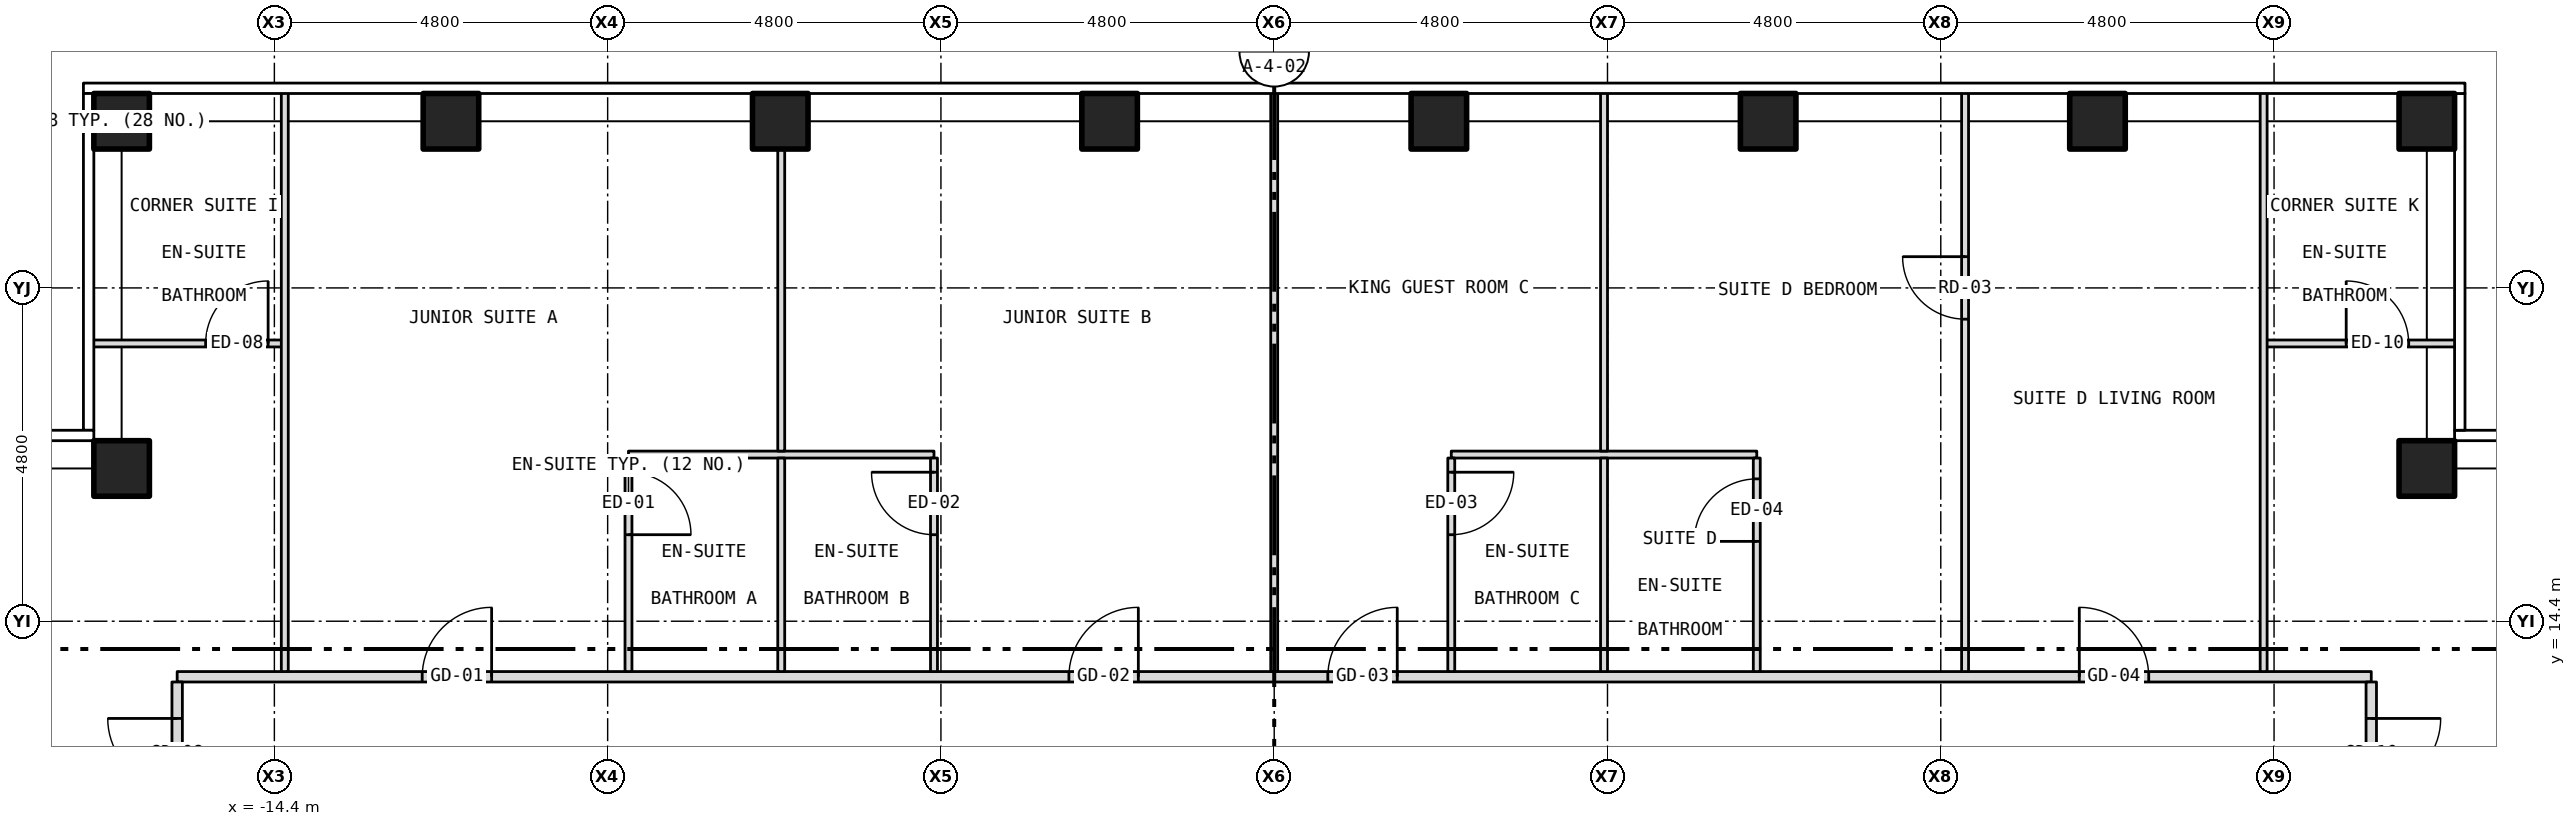
"""IFC4 building model, lengths in metres.
Left out: names, types, materials, properties, quantities, classifications, styles, units other than length and angle.
Written with IfcOpenShell. Run it as: python <this file> out.ifc"""

import sys

from ifc_helpers import new_model, si_unit, direction, frame, frame_2d, origin, origin_2d, place, context, subcontext, project, spatial, rectangle, hollow_rectangle, extrude, element, fill, save


model = new_model("IFC4")
c1 = context("Model", 3, precision=1e-05, world=origin(), true_north=direction((0.0, 1.0)))
c2 = subcontext(c1, "Body", "Model", "MODEL_VIEW")
j1 = project(units=[si_unit("LENGTHUNIT", "METRE"), si_unit("PLANEANGLEUNIT", "RADIAN")], contexts=[c1])
p1 = place(None, origin())
s1 = spatial("IfcSite", under=j1, at=p1, CompositionType="ELEMENT")
p2 = place(p1, origin())
s2 = spatial("IfcBuilding", under=s1, at=p2, CompositionType="ELEMENT")
p3 = place(p2, frame((0.0, 0.0, 179.5)))
s3 = spatial("IfcBuildingStorey", under=s2, at=p3, CompositionType="ELEMENT", Elevation=179.5)
for number, where, z_axis, x_axis in (
    (1, (-16.6, 21.6, -0.15), (0.0, 0.0, 1.0), (1.0, 0.0, 0.0)),
    (2, (-11.857, 21.6, -0.15), (0.0, 0.0, 1.0), (1.0, 0.0, 0.0)),
    (3, (-7.114, 21.6, -0.15), (0.0, 0.0, 1.0), (1.0, 0.0, 0.0)),
    (4, (-2.371, 21.6, -0.15), (0.0, 0.0, 1.0), (1.0, 0.0, 0.0)),
    (5, (2.371, 21.6, -0.15), (0.0, 0.0, 1.0), (1.0, 0.0, 0.0)),
    (6, (7.114, 21.6, -0.15), (0.0, 0.0, 1.0), (1.0, 0.0, 0.0)),
    (7, (11.857, 21.6, -0.15), (0.0, 0.0, 1.0), (1.0, 0.0, 0.0)),
    (8, (16.6, 21.6, -0.15), (0.0, 0.0, 1.0), (1.0, 0.0, 0.0)),
    (9, (-16.6, 16.6, -0.15), (0.0, 0.0, 1.0), (1.0, 0.0, 0.0)),
    (10, (16.6, 16.6, -0.15), (0.0, 0.0, 1.0), (1.0, 0.0, 0.0)),
):
    element("IfcColumn", number, at=place(p3, frame(where, z_axis=z_axis, x_axis=x_axis)), inside=s3, PredefinedType="COLUMN", context=c2, shape_type="SweptSolid", body=[
        extrude(hollow_rectangle(XDim=0.8, YDim=0.8, WallThickness=0.045, at=origin_2d()), origin(), (0.0, 0.0, 1.0), 3.5),
    ])
p4 = place(p3, frame((-15.8, 13.6, 0.0), z_axis=(0.0, 0.0, 1.0), x_axis=(1.0, 0.0, 0.0)))
e11 = element("IfcWall", 11, at=p4, inside=s3, PredefinedType="PARTITIONING", context=c2, shape_type="SweptSolid", body=[
    extrude(rectangle(XDim=31.6, YDim=0.15, at=frame_2d((15.8, 0.0))), origin(), (0.0, 0.0, 1.0), 3.35),
])
p5 = place(p4, frame((3.529, 0.0, 0.0)))
e12 = element("IfcOpeningElement", 12, at=p5, cuts=e11, PredefinedType="OPENING", context=c2, shape_type="SweptSolid", body=[
    extrude(rectangle(XDim=1.0, YDim=2.1, at=frame_2d((0.5, 1.05))), frame((0.0, 0.087, 0.0), z_axis=(0.0, -1.0, 0.0), x_axis=(1.0, 0.0, 0.0)), (0.0, 0.0, 1.0), 0.174),
])
p6 = place(p4, frame((12.843, 0.0, 0.0)))
e13 = element("IfcOpeningElement", 13, at=p6, cuts=e11, PredefinedType="OPENING", context=c2, shape_type="SweptSolid", body=[
    extrude(rectangle(XDim=1.0, YDim=2.1, at=frame_2d((0.5, 1.05))), frame((0.0, 0.087, 0.0), z_axis=(0.0, -1.0, 0.0), x_axis=(1.0, 0.0, 0.0)), (0.0, 0.0, 1.0), 0.174),
])
p7 = place(p4, frame((16.572, 0.0, 0.0)))
e14 = element("IfcOpeningElement", 14, at=p7, cuts=e11, PredefinedType="OPENING", context=c2, shape_type="SweptSolid", body=[
    extrude(rectangle(XDim=1.0, YDim=2.1, at=frame_2d((0.5, 1.05))), frame((0.0, 0.087, 0.0), z_axis=(0.0, -1.0, 0.0), x_axis=(1.0, 0.0, 0.0)), (0.0, 0.0, 1.0), 0.174),
])
p8 = place(p4, frame((27.395, 0.0, 0.0)))
e15 = element("IfcOpeningElement", 15, at=p8, cuts=e11, PredefinedType="OPENING", context=c2, shape_type="SweptSolid", body=[
    extrude(rectangle(XDim=1.0, YDim=2.1, at=frame_2d((0.5, 1.05))), frame((0.0, 0.087, 0.0), z_axis=(0.0, -1.0, 0.0), x_axis=(1.0, 0.0, 0.0)), (0.0, 0.0, 1.0), 0.174),
])
p9 = place(p3, frame((-9.3, 16.8, 0.0), z_axis=(0.0, 0.0, 1.0), x_axis=(1.0, 0.0, 0.0)))
e16 = element("IfcWall", 16, at=p9, inside=s3, PredefinedType="PARTITIONING", context=c2, shape_type="SweptSolid", body=[
    extrude(rectangle(XDim=4.4, YDim=0.1, at=frame_2d((2.2, 0.0))), origin(), (0.0, 0.0, 1.0), 3.35),
])
p10 = place(p3, frame((2.55, 16.8, 0.0), z_axis=(0.0, 0.0, 1.0), x_axis=(1.0, 0.0, 0.0)))
e17 = element("IfcWall", 17, at=p10, inside=s3, PredefinedType="PARTITIONING", context=c2, shape_type="SweptSolid", body=[
    extrude(rectangle(XDim=4.4, YDim=0.1, at=frame_2d((2.2, 0.0))), origin(), (0.0, 0.0, 1.0), 3.35),
])
p11 = place(p3, frame((-17.03, 18.4, 0.0), z_axis=(0.0, 0.0, 1.0), x_axis=(1.0, 0.0, 0.0)))
e18 = element("IfcWall", 18, at=p11, inside=s3, PredefinedType="PARTITIONING", context=c2, shape_type="SweptSolid", body=[
    extrude(rectangle(XDim=2.78, YDim=0.1, at=frame_2d((1.39, 0.0))), origin(), (0.0, 0.0, 1.0), 3.35),
])
p12 = place(p11, frame((1.64, 0.0, 0.0)))
e19 = element("IfcOpeningElement", 19, at=p12, cuts=e18, PredefinedType="OPENING", context=c2, shape_type="SweptSolid", body=[
    extrude(rectangle(XDim=0.9, YDim=2.1, at=frame_2d((0.45, 1.05))), frame((0.0, 0.062, 0.0), z_axis=(0.0, -1.0, 0.0), x_axis=(1.0, 0.0, 0.0)), (0.0, 0.0, 1.0), 0.124),
])
p13 = place(p3, frame((14.25, 18.4, 0.0), z_axis=(0.0, 0.0, 1.0), x_axis=(1.0, 0.0, 0.0)))
e20 = element("IfcWall", 20, at=p13, inside=s3, PredefinedType="PARTITIONING", context=c2, shape_type="SweptSolid", body=[
    extrude(rectangle(XDim=2.78, YDim=0.1, at=frame_2d((1.39, 0.0))), origin(), (0.0, 0.0, 1.0), 3.35),
])
p14 = place(p13, frame((1.189, 0.0, 0.0)))
e21 = element("IfcOpeningElement", 21, at=p14, cuts=e20, PredefinedType="OPENING", context=c2, shape_type="SweptSolid", body=[
    extrude(rectangle(XDim=0.9, YDim=2.1, at=frame_2d((0.45, 1.05))), frame((0.0, 0.062, 0.0), z_axis=(0.0, -1.0, 0.0), x_axis=(1.0, 0.0, 0.0)), (0.0, 0.0, 1.0), 0.124),
])
p15 = place(p3, frame((-15.8, 10.92, 0.0), z_axis=(0.0, 0.0, 1.0), x_axis=(0.0, 1.0, 0.0)))
e22 = element("IfcWall", 22, at=p15, inside=s3, PredefinedType="PARTITIONING", context=c2, shape_type="SweptSolid", body=[
    extrude(rectangle(XDim=2.605, YDim=0.15, at=frame_2d((1.302, 0.0))), origin(), (0.0, 0.0, 1.0), 3.35),
])
p16 = place(p15, frame((1.08, 0.0, 0.0)))
e23 = element("IfcOpeningElement", 23, at=p16, cuts=e22, PredefinedType="OPENING", context=c2, shape_type="SweptSolid", body=[
    extrude(rectangle(XDim=1.0, YDim=2.1, at=frame_2d((0.5, 1.05))), frame((0.0, 0.087, 0.0), z_axis=(0.0, -1.0, 0.0), x_axis=(1.0, 0.0, 0.0)), (0.0, 0.0, 1.0), 0.174),
])
p17 = place(p3, frame((-14.25, 13.675, 0.0), z_axis=(0.0, 0.0, 1.0), x_axis=(0.0, 1.0, 0.0)))
e24 = element("IfcWall", 24, at=p17, inside=s3, PredefinedType="PARTITIONING", context=c2, shape_type="SweptSolid", body=[
    extrude(rectangle(XDim=8.355, YDim=0.1, at=frame_2d((4.177, 0.0))), origin(), (0.0, 0.0, 1.0), 2.817),
])
p18 = place(p3, frame((-9.3, 13.675, 0.0), z_axis=(0.0, 0.0, 1.0), x_axis=(0.0, 1.0, 0.0)))
e25 = element("IfcWall", 25, at=p18, inside=s3, PredefinedType="PARTITIONING", context=c2, shape_type="SweptSolid", body=[
    extrude(rectangle(XDim=3.075, YDim=0.1, at=frame_2d((1.538, 0.0))), origin(), (0.0, 0.0, 1.0), 3.35),
])
p19 = place(p18, frame((1.971, 0.0, 0.0)))
e26 = element("IfcOpeningElement", 26, at=p19, cuts=e25, PredefinedType="OPENING", context=c2, shape_type="SweptSolid", body=[
    extrude(rectangle(XDim=0.9, YDim=2.1, at=frame_2d((0.45, 1.05))), frame((0.0, 0.062, 0.0), z_axis=(0.0, -1.0, 0.0), x_axis=(1.0, 0.0, 0.0)), (0.0, 0.0, 1.0), 0.124),
])
p20 = place(p3, frame((-7.1, 13.675, 0.0), z_axis=(0.0, 0.0, 1.0), x_axis=(0.0, 1.0, 0.0)))
e27 = element("IfcWall", 27, at=p20, inside=s3, PredefinedType="PARTITIONING", context=c2, shape_type="SweptSolid", body=[
    extrude(rectangle(XDim=3.075, YDim=0.1, at=frame_2d((1.538, 0.0))), origin(), (0.0, 0.0, 1.0), 3.35),
])
p21 = place(p3, frame((-7.1, 16.85, 0.0), z_axis=(0.0, 0.0, 1.0), x_axis=(0.0, 1.0, 0.0)))
e28 = element("IfcWall", 28, at=p21, inside=s3, PredefinedType="PARTITIONING", context=c2, shape_type="SweptSolid", body=[
    extrude(rectangle(XDim=4.63, YDim=0.1, at=frame_2d((2.315, 0.0))), origin(), (0.0, 0.0, 1.0), 3.35),
])
p22 = place(p3, frame((-4.9, 13.675, 0.0), z_axis=(0.0, 0.0, 1.0), x_axis=(0.0, 1.0, 0.0)))
e29 = element("IfcWall", 29, at=p22, inside=s3, PredefinedType="PARTITIONING", context=c2, shape_type="SweptSolid", body=[
    extrude(rectangle(XDim=3.075, YDim=0.1, at=frame_2d((1.538, 0.0))), origin(), (0.0, 0.0, 1.0), 2.817),
])
p23 = place(p22, frame((1.971, 0.0, 0.0)))
e30 = element("IfcOpeningElement", 30, at=p23, cuts=e29, PredefinedType="OPENING", context=c2, shape_type="SweptSolid", body=[
    extrude(rectangle(XDim=0.9, YDim=2.1, at=frame_2d((0.45, 1.05))), frame((0.0, 0.062, 0.0), z_axis=(0.0, -1.0, 0.0), x_axis=(1.0, 0.0, 0.0)), (0.0, 0.0, 1.0), 0.124),
])
p24 = place(p3, frame((0.0, 13.675, 0.0), z_axis=(0.0, 0.0, 1.0), x_axis=(0.0, 1.0, 0.0)))
e31 = element("IfcWall", 31, at=p24, inside=s3, PredefinedType="PARTITIONING", context=c2, shape_type="SweptSolid", body=[
    extrude(rectangle(XDim=8.355, YDim=0.1, at=frame_2d((4.177, 0.0))), origin(), (0.0, 0.0, 1.0), 2.728),
])
p25 = place(p3, frame((2.55, 13.675, 0.0), z_axis=(0.0, 0.0, 1.0), x_axis=(0.0, 1.0, 0.0)))
e32 = element("IfcWall", 32, at=p25, inside=s3, PredefinedType="PARTITIONING", context=c2, shape_type="SweptSolid", body=[
    extrude(rectangle(XDim=3.075, YDim=0.1, at=frame_2d((1.538, 0.0))), origin(), (0.0, 0.0, 1.0), 3.35),
])
p26 = place(p25, frame((1.971, 0.0, 0.0)))
e33 = element("IfcOpeningElement", 33, at=p26, cuts=e32, PredefinedType="OPENING", context=c2, shape_type="SweptSolid", body=[
    extrude(rectangle(XDim=0.9, YDim=2.1, at=frame_2d((0.45, 1.05))), frame((0.0, 0.062, 0.0), z_axis=(0.0, -1.0, 0.0), x_axis=(1.0, 0.0, 0.0)), (0.0, 0.0, 1.0), 0.124),
])
p27 = place(p3, frame((4.75, 13.675, 0.0), z_axis=(0.0, 0.0, 1.0), x_axis=(0.0, 1.0, 0.0)))
e34 = element("IfcWall", 34, at=p27, inside=s3, PredefinedType="PARTITIONING", context=c2, shape_type="SweptSolid", body=[
    extrude(rectangle(XDim=3.075, YDim=0.1, at=frame_2d((1.538, 0.0))), origin(), (0.0, 0.0, 1.0), 2.817),
])
p28 = place(p3, frame((4.75, 16.85, 0.0), z_axis=(0.0, 0.0, 1.0), x_axis=(0.0, 1.0, 0.0)))
e35 = element("IfcWall", 35, at=p28, inside=s3, PredefinedType="PARTITIONING", context=c2, shape_type="SweptSolid", body=[
    extrude(rectangle(XDim=5.18, YDim=0.1, at=frame_2d((2.59, 0.0))), origin(), (0.0, 0.0, 1.0), 2.817),
])
p29 = place(p3, frame((6.95, 13.675, 0.0), z_axis=(0.0, 0.0, 1.0), x_axis=(0.0, 1.0, 0.0)))
e36 = element("IfcWall", 36, at=p29, inside=s3, PredefinedType="PARTITIONING", context=c2, shape_type="SweptSolid", body=[
    extrude(rectangle(XDim=3.075, YDim=0.1, at=frame_2d((1.538, 0.0))), origin(), (0.0, 0.0, 1.0), 3.35),
])
p30 = place(p29, frame((1.875, 0.0, 0.0)))
e37 = element("IfcOpeningElement", 37, at=p30, cuts=e36, PredefinedType="OPENING", context=c2, shape_type="SweptSolid", body=[
    extrude(rectangle(XDim=0.9, YDim=2.1, at=frame_2d((0.45, 1.05))), frame((0.0, 0.062, 0.0), z_axis=(0.0, -1.0, 0.0), x_axis=(1.0, 0.0, 0.0)), (0.0, 0.0, 1.0), 0.124),
])
p31 = place(p3, frame((9.95, 13.675, 0.0), z_axis=(0.0, 0.0, 1.0), x_axis=(0.0, 1.0, 0.0)))
e38 = element("IfcWall", 38, at=p31, inside=s3, PredefinedType="PARTITIONING", context=c2, shape_type="SweptSolid", body=[
    extrude(rectangle(XDim=8.355, YDim=0.1, at=frame_2d((4.177, 0.0))), origin(), (0.0, 0.0, 1.0), 3.35),
])
p32 = place(p31, frame((5.075, 0.0, 0.0)))
e39 = element("IfcOpeningElement", 39, at=p32, cuts=e38, PredefinedType="OPENING", context=c2, shape_type="SweptSolid", body=[
    extrude(rectangle(XDim=0.9, YDim=2.1, at=frame_2d((0.45, 1.05))), frame((0.0, 0.062, 0.0), z_axis=(0.0, -1.0, 0.0), x_axis=(1.0, 0.0, 0.0)), (0.0, 0.0, 1.0), 0.124),
])
p33 = place(p3, frame((14.25, 13.675, 0.0), z_axis=(0.0, 0.0, 1.0), x_axis=(0.0, 1.0, 0.0)))
e40 = element("IfcWall", 40, at=p33, inside=s3, PredefinedType="PARTITIONING", context=c2, shape_type="SweptSolid", body=[
    extrude(rectangle(XDim=8.355, YDim=0.1, at=frame_2d((4.177, 0.0))), origin(), (0.0, 0.0, 1.0), 2.817),
])
p34 = place(p3, frame((15.8, 10.92, 0.0), z_axis=(0.0, 0.0, 1.0), x_axis=(0.0, 1.0, 0.0)))
e41 = element("IfcWall", 41, at=p34, inside=s3, PredefinedType="PARTITIONING", context=c2, shape_type="SweptSolid", body=[
    extrude(rectangle(XDim=2.605, YDim=0.15, at=frame_2d((1.302, 0.0))), origin(), (0.0, 0.0, 1.0), 3.35),
])
p35 = place(p34, frame((1.08, 0.0, 0.0)))
e42 = element("IfcOpeningElement", 42, at=p35, cuts=e41, PredefinedType="OPENING", context=c2, shape_type="SweptSolid", body=[
    extrude(rectangle(XDim=1.0, YDim=2.1, at=frame_2d((0.5, 1.05))), frame((0.0, 0.087, 0.0), z_axis=(0.0, -1.0, 0.0), x_axis=(1.0, 0.0, 0.0)), (0.0, 0.0, 1.0), 0.174),
])
p36 = place(p5, origin())
e43 = element("IfcDoor", 43, at=p36, inside=s3, OperationType="SINGLE_SWING_RIGHT", PredefinedType="DOOR", context=c2, shape_type="SweptSolid", body=[
    extrude(rectangle(XDim=1.0, YDim=2.1, at=frame_2d((0.5, 1.05))), frame((0.0, 0.025, 0.0), z_axis=(0.0, -1.0, 0.0), x_axis=(1.0, 0.0, 0.0)), (0.0, 0.0, 1.0), 0.05),
])
fill(e12, e43)
p37 = place(p19, origin())
e44 = element("IfcDoor", 44, at=p37, inside=s3, OperationType="SINGLE_SWING_LEFT", PredefinedType="DOOR", context=c2, shape_type="SweptSolid", body=[
    extrude(rectangle(XDim=0.9, YDim=2.1, at=frame_2d((0.45, 1.05))), frame((0.0, 0.025, 0.0), z_axis=(0.0, -1.0, 0.0), x_axis=(1.0, 0.0, 0.0)), (0.0, 0.0, 1.0), 0.05),
])
fill(e26, e44)
p38 = place(p6, origin())
e45 = element("IfcDoor", 45, at=p38, inside=s3, OperationType="SINGLE_SWING_RIGHT", PredefinedType="DOOR", context=c2, shape_type="SweptSolid", body=[
    extrude(rectangle(XDim=1.0, YDim=2.1, at=frame_2d((0.5, 1.05))), frame((0.0, 0.025, 0.0), z_axis=(0.0, -1.0, 0.0), x_axis=(1.0, 0.0, 0.0)), (0.0, 0.0, 1.0), 0.05),
])
fill(e13, e45)
p39 = place(p23, origin())
e46 = element("IfcDoor", 46, at=p39, inside=s3, OperationType="SINGLE_SWING_RIGHT", PredefinedType="DOOR", context=c2, shape_type="SweptSolid", body=[
    extrude(rectangle(XDim=0.9, YDim=2.1, at=frame_2d((0.45, 1.05))), frame((0.0, 0.025, 0.0), z_axis=(0.0, -1.0, 0.0), x_axis=(1.0, 0.0, 0.0)), (0.0, 0.0, 1.0), 0.05),
])
fill(e30, e46)
p40 = place(p7, origin())
e47 = element("IfcDoor", 47, at=p40, inside=s3, OperationType="SINGLE_SWING_RIGHT", PredefinedType="DOOR", context=c2, shape_type="SweptSolid", body=[
    extrude(rectangle(XDim=1.0, YDim=2.1, at=frame_2d((0.5, 1.05))), frame((0.0, 0.025, 0.0), z_axis=(0.0, -1.0, 0.0), x_axis=(1.0, 0.0, 0.0)), (0.0, 0.0, 1.0), 0.05),
])
fill(e14, e47)
p41 = place(p26, origin())
e48 = element("IfcDoor", 48, at=p41, inside=s3, OperationType="SINGLE_SWING_RIGHT", PredefinedType="DOOR", context=c2, shape_type="SweptSolid", body=[
    extrude(rectangle(XDim=0.9, YDim=2.1, at=frame_2d((0.45, 1.05))), frame((0.0, 0.025, 0.0), z_axis=(0.0, -1.0, 0.0), x_axis=(1.0, 0.0, 0.0)), (0.0, 0.0, 1.0), 0.05),
])
fill(e33, e48)
p42 = place(p8, origin())
e49 = element("IfcDoor", 49, at=p42, inside=s3, OperationType="SINGLE_SWING_LEFT", PredefinedType="DOOR", context=c2, shape_type="SweptSolid", body=[
    extrude(rectangle(XDim=1.0, YDim=2.1, at=frame_2d((0.5, 1.05))), frame((0.0, 0.025, 0.0), z_axis=(0.0, -1.0, 0.0), x_axis=(1.0, 0.0, 0.0)), (0.0, 0.0, 1.0), 0.05),
])
fill(e15, e49)
p43 = place(p32, origin())
e50 = element("IfcDoor", 50, at=p43, inside=s3, OperationType="SINGLE_SWING_RIGHT", PredefinedType="DOOR", context=c2, shape_type="SweptSolid", body=[
    extrude(rectangle(XDim=0.9, YDim=2.1, at=frame_2d((0.45, 1.05))), frame((0.0, 0.025, 0.0), z_axis=(0.0, -1.0, 0.0), x_axis=(1.0, 0.0, 0.0)), (0.0, 0.0, 1.0), 0.05),
])
fill(e39, e50)
p44 = place(p30, origin())
e51 = element("IfcDoor", 51, at=p44, inside=s3, OperationType="SINGLE_SWING_LEFT", PredefinedType="DOOR", context=c2, shape_type="SweptSolid", body=[
    extrude(rectangle(XDim=0.9, YDim=2.1, at=frame_2d((0.45, 1.05))), frame((0.0, 0.025, 0.0), z_axis=(0.0, -1.0, 0.0), x_axis=(1.0, 0.0, 0.0)), (0.0, 0.0, 1.0), 0.05),
])
fill(e37, e51)
p45 = place(p12, origin())
e52 = element("IfcDoor", 52, at=p45, inside=s3, OperationType="SINGLE_SWING_RIGHT", PredefinedType="DOOR", context=c2, shape_type="SweptSolid", body=[
    extrude(rectangle(XDim=0.9, YDim=2.1, at=frame_2d((0.45, 1.05))), frame((0.0, 0.025, 0.0), z_axis=(0.0, -1.0, 0.0), x_axis=(1.0, 0.0, 0.0)), (0.0, 0.0, 1.0), 0.05),
])
fill(e19, e52)
p46 = place(p16, origin())
e53 = element("IfcDoor", 53, at=p46, inside=s3, OperationType="SINGLE_SWING_RIGHT", PredefinedType="DOOR", context=c2, shape_type="SweptSolid", body=[
    extrude(rectangle(XDim=1.0, YDim=2.1, at=frame_2d((0.5, 1.05))), frame((0.0, 0.025, 0.0), z_axis=(0.0, -1.0, 0.0), x_axis=(1.0, 0.0, 0.0)), (0.0, 0.0, 1.0), 0.05),
])
fill(e23, e53)
p47 = place(p14, origin())
e54 = element("IfcDoor", 54, at=p47, inside=s3, OperationType="SINGLE_SWING_LEFT", PredefinedType="DOOR", context=c2, shape_type="SweptSolid", body=[
    extrude(rectangle(XDim=0.9, YDim=2.1, at=frame_2d((0.45, 1.05))), frame((0.0, 0.025, 0.0), z_axis=(0.0, -1.0, 0.0), x_axis=(1.0, 0.0, 0.0)), (0.0, 0.0, 1.0), 0.05),
])
fill(e21, e54)
p48 = place(p35, origin())
e55 = element("IfcDoor", 55, at=p48, inside=s3, OperationType="SINGLE_SWING_RIGHT", PredefinedType="DOOR", context=c2, shape_type="SweptSolid", body=[
    extrude(rectangle(XDim=1.0, YDim=2.1, at=frame_2d((0.5, 1.05))), frame((0.0, 0.025, 0.0), z_axis=(0.0, -1.0, 0.0), x_axis=(1.0, 0.0, 0.0)), (0.0, 0.0, 1.0), 0.05),
])
fill(e42, e55)
save(model, sys.argv[1])
